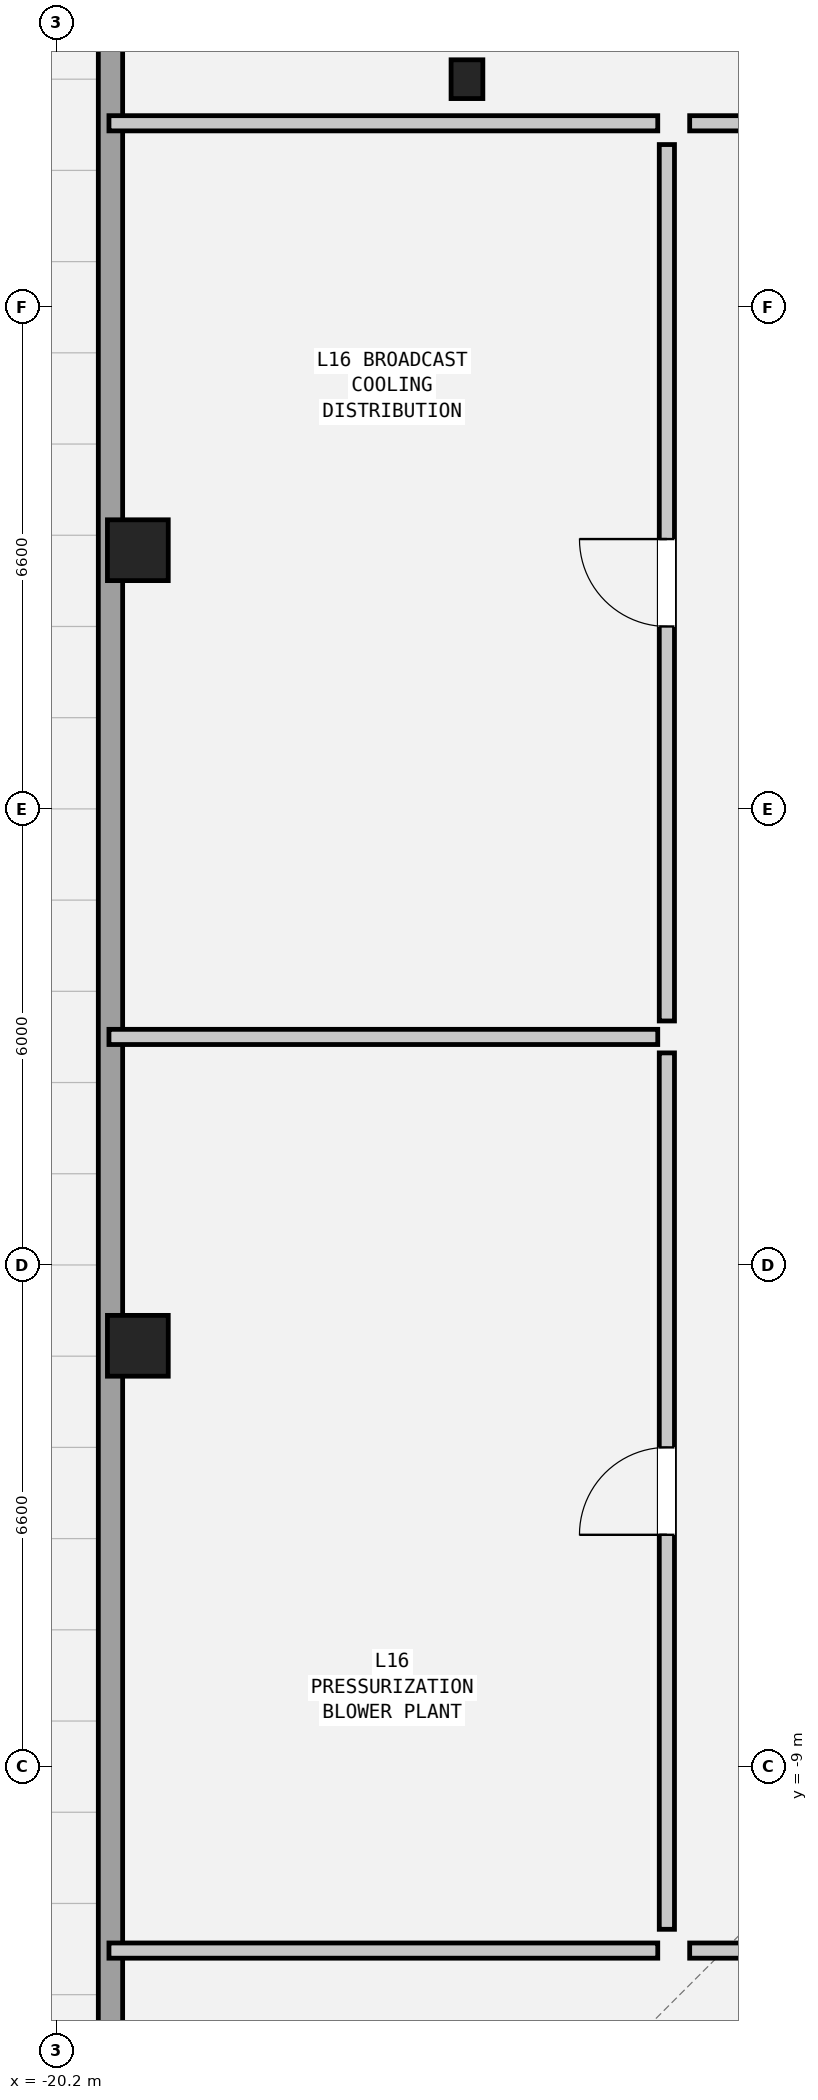
"""IFC4 building model, lengths in metres.
Left out: names, types, materials, properties, quantities, classifications, styles, units other than length and angle.
Written with IfcOpenShell. Run it as: python <this file> out.ifc"""

import sys

from ifc_helpers import new_model, si_unit, direction, frame, frame_2d, origin, origin_2d, place, context, subcontext, project, spatial, rectangle, hollow_rectangle, i_section, extrude, element, fill, save


model = new_model("IFC4")
c1 = context("Model", 3, precision=1e-05, world=origin(), true_north=direction((0.0, 1.0)))
c2 = subcontext(c1, "Body", "Model", "MODEL_VIEW")
j1 = project(units=[si_unit("LENGTHUNIT", "METRE"), si_unit("PLANEANGLEUNIT", "RADIAN")], contexts=[c1])
p1 = place(None, origin())
s1 = spatial("IfcSite", under=j1, at=p1, CompositionType="ELEMENT")
p2 = place(p1, origin())
s2 = spatial("IfcBuilding", under=s1, at=p2, CompositionType="ELEMENT")
p3 = place(p2, frame((0.0, 0.0, 57.9)))
s3 = spatial("IfcBuildingStorey", under=s2, at=p3, CompositionType="ELEMENT", Elevation=57.9)
for number, where, z_axis, x_axis in (
    (1, (-19.13, 7.003, 0.0), (0.0, 0.0, 1.0), (0.0, 1.0, 0.0)),
    (2, (-19.13, -3.463, 0.0), (0.0, 0.0, 1.0), (0.0, 1.0, 0.0)),
):
    element("IfcColumn", number, at=place(p3, frame(where, z_axis=z_axis, x_axis=x_axis)), inside=s3, PredefinedType="COLUMN", context=c2, shape_type="SweptSolid", body=[
        extrude(hollow_rectangle(XDim=0.8, YDim=0.8, WallThickness=0.05, at=origin_2d()), origin(), (0.0, 0.0, 1.0), 3.6),
    ])
p4 = place(p3, frame((-14.8, 13.2, 0.0), z_axis=(0.0, 0.0, 1.0), x_axis=(1.0, 0.0, 0.0)))
e3 = element("IfcColumn", 3, at=p4, inside=s3, PredefinedType="COLUMN", context=c2, shape_type="SweptSolid", body=[
    extrude(i_section(OverallWidth=0.418, OverallDepth=0.51, WebThickness=0.042, FlangeThickness=0.068, at=origin_2d()), origin(), (0.0, 0.0, 1.0), 3.6),
])
p5 = place(p3, frame((-19.49, -13.542, 0.0), z_axis=(0.0, 0.0, 1.0), x_axis=(0.0, 1.0, 0.0)))
e4 = element("IfcWall", 4, at=p5, inside=s3, PredefinedType="SOLIDWALL", context=c2, shape_type="SweptSolid", body=[
    extrude(rectangle(XDim=30.624, YDim=0.32, at=frame_2d((15.312, 0.0))), origin(), (0.0, 0.0, 1.0), 2.242),
])
p6 = place(p3, frame((-11.87, 12.62, 0.0), z_axis=(0.0, 0.0, 1.0), x_axis=(1.0, 0.0, 0.0)))
e5 = element("IfcWall", 5, at=p6, inside=s3, PredefinedType="PARTITIONING", context=c2, shape_type="SweptSolid", body=[
    extrude(rectangle(XDim=5.89, YDim=0.2, at=frame_2d((2.945, 0.0))), origin(), (0.0, 0.0, 1.0), 3.38),
])
p7 = place(p6, frame((2.37, 0.0, 0.0)))
e6 = element("IfcOpeningElement", 6, at=p7, cuts=e5, PredefinedType="OPENING", context=c2, shape_type="SweptSolid", body=[
    extrude(rectangle(XDim=1.15, YDim=2.1, at=frame_2d((0.575, 1.05))), frame((0.0, 0.112, 0.0), z_axis=(0.0, -1.0, 0.0), x_axis=(1.0, 0.0, 0.0)), (0.0, 0.0, 1.0), 0.224),
])
p8 = place(p3, frame((-11.87, -11.42, 0.0), z_axis=(0.0, 0.0, 1.0), x_axis=(1.0, 0.0, 0.0)))
e7 = element("IfcWall", 7, at=p8, inside=s3, PredefinedType="PARTITIONING", context=c2, shape_type="SweptSolid", body=[
    extrude(rectangle(XDim=5.89, YDim=0.2, at=frame_2d((2.945, 0.0))), origin(), (0.0, 0.0, 1.0), 2.901),
])
p9 = place(p8, frame((2.37, 0.0, 0.0)))
e8 = element("IfcOpeningElement", 8, at=p9, cuts=e7, PredefinedType="OPENING", context=c2, shape_type="SweptSolid", body=[
    extrude(rectangle(XDim=1.15, YDim=2.1, at=frame_2d((0.575, 1.05))), frame((0.0, 0.112, 0.0), z_axis=(0.0, -1.0, 0.0), x_axis=(1.0, 0.0, 0.0)), (0.0, 0.0, 1.0), 0.224),
])
p10 = place(p3, frame((-19.51, 12.62, 0.0), z_axis=(0.0, 0.0, 1.0), x_axis=(1.0, 0.0, 0.0)))
e9 = element("IfcWall", 9, at=p10, inside=s3, PredefinedType="PARTITIONING", context=c2, shape_type="SweptSolid", body=[
    extrude(rectangle(XDim=7.22, YDim=0.2, at=frame_2d((3.61, 0.0))), origin(), (0.0, 0.0, 1.0), 3.38),
])
for number, where, z_axis, x_axis in (
    (10, (-19.51, -11.42, 0.0), (0.0, 0.0, 1.0), (1.0, 0.0, 0.0)),
    (11, (-19.51, 0.6, 0.0), (0.0, 0.0, 1.0), (1.0, 0.0, 0.0)),
):
    element("IfcWall", number, at=place(p3, frame(where, z_axis=z_axis, x_axis=x_axis)), inside=s3, PredefinedType="PARTITIONING", context=c2, shape_type="SweptSolid", body=[
        extrude(rectangle(XDim=7.22, YDim=0.2, at=frame_2d((3.61, 0.0))), origin(), (0.0, 0.0, 1.0), 2.901),
    ])
p11 = place(p3, frame((-12.17, -11.14, 0.0), z_axis=(0.0, 0.0, 1.0), x_axis=(0.0, 1.0, 0.0)))
e12 = element("IfcWall", 12, at=p11, inside=s3, PredefinedType="PARTITIONING", context=c2, shape_type="SweptSolid", body=[
    extrude(rectangle(XDim=11.53, YDim=0.2, at=frame_2d((5.765, 0.0))), origin(), (0.0, 0.0, 1.0), 3.38),
])
p12 = place(p11, frame((5.19, 0.0, 0.0)))
e13 = element("IfcOpeningElement", 13, at=p12, cuts=e12, PredefinedType="OPENING", context=c2, shape_type="SweptSolid", body=[
    extrude(rectangle(XDim=1.15, YDim=2.1, at=frame_2d((0.575, 1.05))), frame((0.0, 0.112, 0.0), z_axis=(0.0, -1.0, 0.0), x_axis=(1.0, 0.0, 0.0)), (0.0, 0.0, 1.0), 0.224),
])
p13 = place(p3, frame((-12.17, 0.81, 0.0), z_axis=(0.0, 0.0, 1.0), x_axis=(0.0, 1.0, 0.0)))
e14 = element("IfcWall", 14, at=p13, inside=s3, PredefinedType="PARTITIONING", context=c2, shape_type="SweptSolid", body=[
    extrude(rectangle(XDim=11.53, YDim=0.2, at=frame_2d((5.765, 0.0))), origin(), (0.0, 0.0, 1.0), 3.38),
])
p14 = place(p13, frame((5.19, 0.0, 0.0)))
e15 = element("IfcOpeningElement", 15, at=p14, cuts=e14, PredefinedType="OPENING", context=c2, shape_type="SweptSolid", body=[
    extrude(rectangle(XDim=1.15, YDim=2.1, at=frame_2d((0.575, 1.05))), frame((0.0, 0.112, 0.0), z_axis=(0.0, -1.0, 0.0), x_axis=(1.0, 0.0, 0.0)), (0.0, 0.0, 1.0), 0.224),
])
p15 = place(p12, origin())
e16 = element("IfcDoor", 16, at=p15, inside=s3, OperationType="SINGLE_SWING_LEFT", PredefinedType="DOOR", context=c2, shape_type="SweptSolid", body=[
    extrude(rectangle(XDim=1.15, YDim=2.1, at=frame_2d((0.575, 1.05))), frame((0.0, 0.025, 0.0), z_axis=(0.0, -1.0, 0.0), x_axis=(1.0, 0.0, 0.0)), (0.0, 0.0, 1.0), 0.05),
])
fill(e13, e16)
p16 = place(p14, origin())
e17 = element("IfcDoor", 17, at=p16, inside=s3, OperationType="SINGLE_SWING_RIGHT", PredefinedType="DOOR", context=c2, shape_type="SweptSolid", body=[
    extrude(rectangle(XDim=1.15, YDim=2.1, at=frame_2d((0.575, 1.05))), frame((0.0, 0.025, 0.0), z_axis=(0.0, -1.0, 0.0), x_axis=(1.0, 0.0, 0.0)), (0.0, 0.0, 1.0), 0.05),
])
fill(e15, e17)
save(model, sys.argv[1])
